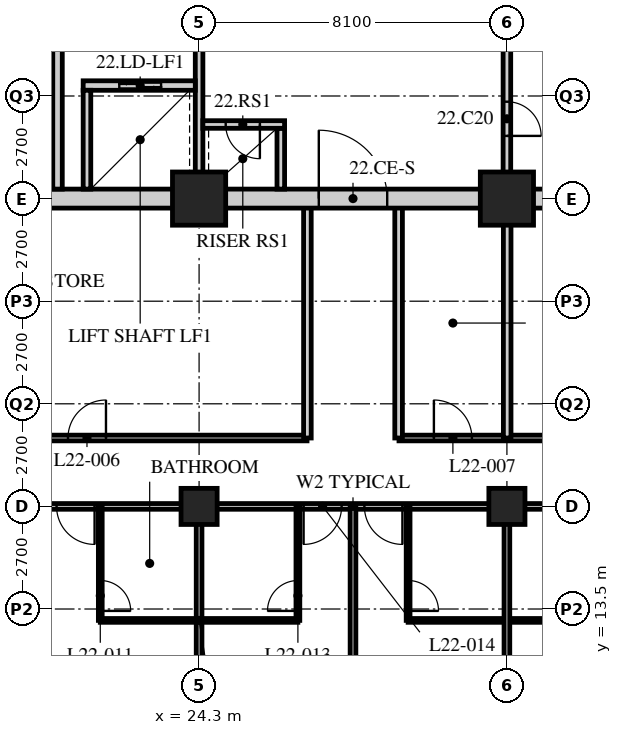
"""IFC4 building model, lengths in metres.
Left out: names, types, materials, properties, quantities, classifications, styles, units other than length and angle.
Written with IfcOpenShell. Run it as: python <this file> out.ifc"""

import sys

from ifc_helpers import new_model, si_unit, direction, frame, frame_2d, origin, origin_2d, place, context, subcontext, project, spatial, rectangle, hollow_rectangle, extrude, element, fill, save


model = new_model("IFC4")
c1 = context("Model", 3, precision=1e-05, world=origin(), true_north=direction((0.0, 1.0)))
c2 = subcontext(c1, "Body", "Model", "MODEL_VIEW")
j1 = project(units=[si_unit("LENGTHUNIT", "METRE"), si_unit("PLANEANGLEUNIT", "RADIAN")], contexts=[c1])
p1 = place(None, origin())
s1 = spatial("IfcSite", under=j1, at=p1, CompositionType="ELEMENT")
p2 = place(p1, origin())
s2 = spatial("IfcBuilding", under=s1, at=p2, CompositionType="ELEMENT")
p3 = place(p2, frame((0.0, 0.0, 87.4)))
s3 = spatial("IfcBuildingStorey", under=s2, at=p3, CompositionType="ELEMENT", Elevation=87.4)
p4 = place(p3, frame((24.3, 16.2, 0.0), z_axis=(0.0, 0.0, 1.0), x_axis=(1.0, 0.0, 0.0)))
e1 = element("IfcColumn", 1, at=p4, inside=s3, PredefinedType="COLUMN", context=c2, shape_type="SweptSolid", body=[
    extrude(hollow_rectangle(XDim=0.95, YDim=0.95, WallThickness=0.095, at=origin_2d()), origin(), (0.0, 0.0, 1.0), 3.4),
])
p5 = place(p3, frame((24.3, 24.3, 0.0), z_axis=(0.0, 0.0, 1.0), x_axis=(1.0, 0.0, 0.0)))
e2 = element("IfcColumn", 2, at=p5, inside=s3, PredefinedType="COLUMN", context=c2, shape_type="SweptSolid", body=[
    extrude(hollow_rectangle(XDim=1.4, YDim=1.4, WallThickness=0.12, at=origin_2d()), origin(), (0.0, 0.0, 1.0), 3.4),
])
p6 = place(p3, frame((32.4, 16.2, 0.0), z_axis=(0.0, 0.0, 1.0), x_axis=(1.0, 0.0, 0.0)))
e3 = element("IfcColumn", 3, at=p6, inside=s3, PredefinedType="COLUMN", context=c2, shape_type="SweptSolid", body=[
    extrude(hollow_rectangle(XDim=0.95, YDim=0.95, WallThickness=0.095, at=origin_2d()), origin(), (0.0, 0.0, 1.0), 3.4),
])
p7 = place(p3, frame((32.4, 24.3, 0.0), z_axis=(0.0, 0.0, 1.0), x_axis=(1.0, 0.0, 0.0)))
e4 = element("IfcColumn", 4, at=p7, inside=s3, PredefinedType="COLUMN", context=c2, shape_type="SweptSolid", body=[
    extrude(hollow_rectangle(XDim=1.4, YDim=1.4, WallThickness=0.12, at=origin_2d()), origin(), (0.0, 0.0, 1.0), 3.4),
])
p8 = place(p3, frame((12.15, 16.2, 0.0), z_axis=(0.0, 0.0, 1.0), x_axis=(1.0, 0.0, 0.0)))
e5 = element("IfcWall", 5, at=p8, inside=s3, PredefinedType="PARTITIONING", context=c2, shape_type="SweptSolid", body=[
    extrude(rectangle(XDim=32.4, YDim=0.15, at=frame_2d((16.2, 0.0))), origin(), (0.0, 0.0, 1.0), 2.388),
])
p9 = place(p8, frame((6.5, 0.0, 0.0)))
e6 = element("IfcOpeningElement", 6, at=p9, cuts=e5, PredefinedType="OPENING", context=c2, shape_type="SweptSolid", body=[
    extrude(rectangle(XDim=1.0, YDim=2.1, at=frame_2d((0.5, 1.05))), frame((0.0, 0.085, 0.0), z_axis=(0.0, -1.0, 0.0), x_axis=(1.0, 0.0, 0.0)), (0.0, 0.0, 1.0), 0.17),
])
p10 = place(p8, frame((8.4, 0.0, 0.0)))
e7 = element("IfcOpeningElement", 7, at=p10, cuts=e5, PredefinedType="OPENING", context=c2, shape_type="SweptSolid", body=[
    extrude(rectangle(XDim=1.0, YDim=2.1, at=frame_2d((0.5, 1.05))), frame((0.0, 0.085, 0.0), z_axis=(0.0, -1.0, 0.0), x_axis=(1.0, 0.0, 0.0)), (0.0, 0.0, 1.0), 0.17),
])
p11 = place(p8, frame((14.9, 0.0, 0.0)))
e8 = element("IfcOpeningElement", 8, at=p11, cuts=e5, PredefinedType="OPENING", context=c2, shape_type="SweptSolid", body=[
    extrude(rectangle(XDim=1.0, YDim=2.1, at=frame_2d((0.5, 1.05))), frame((0.0, 0.085, 0.0), z_axis=(0.0, -1.0, 0.0), x_axis=(1.0, 0.0, 0.0)), (0.0, 0.0, 1.0), 0.17),
])
p12 = place(p8, frame((16.5, 0.0, 0.0)))
e9 = element("IfcOpeningElement", 9, at=p12, cuts=e5, PredefinedType="OPENING", context=c2, shape_type="SweptSolid", body=[
    extrude(rectangle(XDim=1.0, YDim=2.1, at=frame_2d((0.5, 1.05))), frame((0.0, 0.085, 0.0), z_axis=(0.0, -1.0, 0.0), x_axis=(1.0, 0.0, 0.0)), (0.0, 0.0, 1.0), 0.17),
])
p13 = place(p8, frame((23.0, 0.0, 0.0)))
e10 = element("IfcOpeningElement", 10, at=p13, cuts=e5, PredefinedType="OPENING", context=c2, shape_type="SweptSolid", body=[
    extrude(rectangle(XDim=1.0, YDim=2.1, at=frame_2d((0.5, 1.05))), frame((0.0, 0.085, 0.0), z_axis=(0.0, -1.0, 0.0), x_axis=(1.0, 0.0, 0.0)), (0.0, 0.0, 1.0), 0.17),
])
p14 = place(p8, frame((24.9, 0.0, 0.0)))
e11 = element("IfcOpeningElement", 11, at=p14, cuts=e5, PredefinedType="OPENING", context=c2, shape_type="SweptSolid", body=[
    extrude(rectangle(XDim=1.0, YDim=2.1, at=frame_2d((0.5, 1.05))), frame((0.0, 0.085, 0.0), z_axis=(0.0, -1.0, 0.0), x_axis=(1.0, 0.0, 0.0)), (0.0, 0.0, 1.0), 0.17),
])
p15 = place(p8, frame((1.525, 0.0, 0.0)))
e12 = element("IfcOpeningElement", 12, at=p15, cuts=e5, PredefinedType="OPENING", context=c2, shape_type="SweptSolid", body=[
    extrude(rectangle(XDim=1.0, YDim=2.1, at=frame_2d((0.5, 1.05))), frame((0.0, 0.085, 0.0), z_axis=(0.0, -1.0, 0.0), x_axis=(1.0, 0.0, 0.0)), (0.0, 0.0, 1.0), 0.17),
])
p16 = place(p8, frame((29.875, 0.0, 0.0)))
e13 = element("IfcOpeningElement", 13, at=p16, cuts=e5, PredefinedType="OPENING", context=c2, shape_type="SweptSolid", body=[
    extrude(rectangle(XDim=1.0, YDim=2.1, at=frame_2d((0.5, 1.05))), frame((0.0, 0.085, 0.0), z_axis=(0.0, -1.0, 0.0), x_axis=(1.0, 0.0, 0.0)), (0.0, 0.0, 1.0), 0.17),
])
p17 = place(p3, frame((13.95, 18.0, 0.0), z_axis=(0.0, 0.0, 1.0), x_axis=(1.0, 0.0, 0.0)))
e14 = element("IfcWall", 14, at=p17, inside=s3, PredefinedType="PARTITIONING", context=c2, shape_type="SweptSolid", body=[
    extrude(rectangle(XDim=13.19, YDim=0.15, at=frame_2d((6.595, 0.0))), origin(), (0.0, 0.0, 1.0), 3.15),
])
p18 = place(p17, frame((0.3, 0.0, 0.0)))
e15 = element("IfcOpeningElement", 15, at=p18, cuts=e14, PredefinedType="OPENING", context=c2, shape_type="SweptSolid", body=[
    extrude(rectangle(XDim=1.0, YDim=2.1, at=frame_2d((0.5, 1.05))), frame((0.0, 0.085, 0.0), z_axis=(0.0, -1.0, 0.0), x_axis=(1.0, 0.0, 0.0)), (0.0, 0.0, 1.0), 0.17),
])
p19 = place(p17, frame((6.9, 0.0, 0.0)))
e16 = element("IfcOpeningElement", 16, at=p19, cuts=e14, PredefinedType="OPENING", context=c2, shape_type="SweptSolid", body=[
    extrude(rectangle(XDim=1.0, YDim=2.1, at=frame_2d((0.5, 1.05))), frame((0.0, 0.085, 0.0), z_axis=(0.0, -1.0, 0.0), x_axis=(1.0, 0.0, 0.0)), (0.0, 0.0, 1.0), 0.17),
])
p20 = place(p3, frame((29.56, 18.0, 0.0), z_axis=(0.0, 0.0, 1.0), x_axis=(1.0, 0.0, 0.0)))
e17 = element("IfcWall", 17, at=p20, inside=s3, PredefinedType="PARTITIONING", context=c2, shape_type="SweptSolid", body=[
    extrude(rectangle(XDim=13.19, YDim=0.15, at=frame_2d((6.595, 0.0))), origin(), (0.0, 0.0, 1.0), 3.15),
])
p21 = place(p20, frame((0.919, 0.0, 0.0)))
e18 = element("IfcOpeningElement", 18, at=p21, cuts=e17, PredefinedType="OPENING", context=c2, shape_type="SweptSolid", body=[
    extrude(rectangle(XDim=1.0, YDim=2.1, at=frame_2d((0.5, 1.05))), frame((0.0, 0.085, 0.0), z_axis=(0.0, -1.0, 0.0), x_axis=(1.0, 0.0, 0.0)), (0.0, 0.0, 1.0), 0.17),
])
p22 = place(p20, frame((7.519, 0.0, 0.0)))
e19 = element("IfcOpeningElement", 19, at=p22, cuts=e17, PredefinedType="OPENING", context=c2, shape_type="SweptSolid", body=[
    extrude(rectangle(XDim=1.0, YDim=2.1, at=frame_2d((0.5, 1.05))), frame((0.0, 0.085, 0.0), z_axis=(0.0, -1.0, 0.0), x_axis=(1.0, 0.0, 0.0)), (0.0, 0.0, 1.0), 0.17),
])
p23 = place(p3, frame((32.407, 18.0, 0.0), z_axis=(0.0, 0.0, 1.0), x_axis=(0.0, 1.0, 0.0)))
e20 = element("IfcWall", 20, at=p23, inside=s3, PredefinedType="SOLIDWALL", context=c2, shape_type="SweptSolid", body=[
    extrude(rectangle(XDim=6.3, YDim=0.2, at=frame_2d((3.15, 0.0))), origin(), (0.0, 0.0, 1.0), 2.05),
])
for number, where, z_axis, x_axis in (
    (21, (27.15, 18.0, 0.0), (0.0, 0.0, 1.0), (0.0, 1.0, 0.0)),
    (22, (29.55, 18.0, 0.0), (0.0, 0.0, 1.0), (0.0, 1.0, 0.0)),
):
    element("IfcWall", number, at=place(p3, frame(where, z_axis=z_axis, x_axis=x_axis)), inside=s3, PredefinedType="SOLIDWALL", context=c2, shape_type="SweptSolid", body=[
        extrude(rectangle(XDim=6.3, YDim=0.2, at=frame_2d((3.15, 0.0))), origin(), (0.0, 0.0, 1.0), 3.15),
    ])
p24 = place(p3, frame((21.7, 13.2, 0.0), z_axis=(0.0, 0.0, 1.0), x_axis=(1.0, 0.0, 0.0)))
e23 = element("IfcWall", 23, at=p24, inside=s3, PredefinedType="PARTITIONING", context=c2, shape_type="SweptSolid", body=[
    extrude(rectangle(XDim=5.2, YDim=0.1, at=frame_2d((2.6, 0.0))), origin(), (0.0, 0.0, 1.0), 3.15),
])
p25 = place(p3, frame((21.7, 16.2, 0.0), z_axis=(0.0, 0.0, 1.0), x_axis=(0.0, -1.0, 0.0)))
e24 = element("IfcWall", 24, at=p25, inside=s3, PredefinedType="PARTITIONING", context=c2, shape_type="SweptSolid", body=[
    extrude(rectangle(XDim=3.0, YDim=0.1, at=frame_2d((1.5, 0.0))), origin(), (0.0, 0.0, 1.0), 3.15),
])
p26 = place(p25, frame((1.95, 0.0, 0.0)))
e25 = element("IfcOpeningElement", 25, at=p26, cuts=e24, PredefinedType="OPENING", context=c2, shape_type="SweptSolid", body=[
    extrude(rectangle(XDim=0.8, YDim=2.1, at=frame_2d((0.4, 1.05))), frame((0.0, 0.06, 0.0), z_axis=(0.0, -1.0, 0.0), x_axis=(1.0, 0.0, 0.0)), (0.0, 0.0, 1.0), 0.12),
])
p27 = place(p3, frame((24.3, 16.2, 0.0), z_axis=(0.0, 0.0, 1.0), x_axis=(0.0, -1.0, 0.0)))
e26 = element("IfcWall", 26, at=p27, inside=s3, PredefinedType="PARTITIONING", context=c2, shape_type="SweptSolid", body=[
    extrude(rectangle(XDim=15.9, YDim=0.15, at=frame_2d((7.95, 0.0))), origin(), (0.0, 0.0, 1.0), 2.05),
])
p28 = place(p3, frame((26.9, 16.2, 0.0), z_axis=(0.0, 0.0, 1.0), x_axis=(0.0, -1.0, 0.0)))
e27 = element("IfcWall", 27, at=p28, inside=s3, PredefinedType="PARTITIONING", context=c2, shape_type="SweptSolid", body=[
    extrude(rectangle(XDim=3.0, YDim=0.1, at=frame_2d((1.5, 0.0))), origin(), (0.0, 0.0, 1.0), 3.15),
])
p29 = place(p28, frame((1.95, 0.0, 0.0)))
e28 = element("IfcOpeningElement", 28, at=p29, cuts=e27, PredefinedType="OPENING", context=c2, shape_type="SweptSolid", body=[
    extrude(rectangle(XDim=0.8, YDim=2.1, at=frame_2d((0.4, 1.05))), frame((0.0, 0.06, 0.0), z_axis=(0.0, -1.0, 0.0), x_axis=(1.0, 0.0, 0.0)), (0.0, 0.0, 1.0), 0.12),
])
p30 = place(p3, frame((28.35, 16.2, 0.0), z_axis=(0.0, 0.0, 1.0), x_axis=(0.0, -1.0, 0.0)))
e29 = element("IfcWall", 29, at=p30, inside=s3, PredefinedType="PARTITIONING", context=c2, shape_type="SweptSolid", body=[
    extrude(rectangle(XDim=15.9, YDim=0.15, at=frame_2d((7.95, 0.0))), origin(), (0.0, 0.0, 1.0), 3.15),
])
p31 = place(p3, frame((29.8, 13.2, 0.0), z_axis=(0.0, 0.0, 1.0), x_axis=(1.0, 0.0, 0.0)))
e30 = element("IfcWall", 30, at=p31, inside=s3, PredefinedType="PARTITIONING", context=c2, shape_type="SweptSolid", body=[
    extrude(rectangle(XDim=5.2, YDim=0.1, at=frame_2d((2.6, 0.0))), origin(), (0.0, 0.0, 1.0), 3.15),
])
p32 = place(p3, frame((29.8, 16.2, 0.0), z_axis=(0.0, 0.0, 1.0), x_axis=(0.0, -1.0, 0.0)))
e31 = element("IfcWall", 31, at=p32, inside=s3, PredefinedType="PARTITIONING", context=c2, shape_type="SweptSolid", body=[
    extrude(rectangle(XDim=3.0, YDim=0.1, at=frame_2d((1.5, 0.0))), origin(), (0.0, 0.0, 1.0), 3.15),
])
p33 = place(p32, frame((1.95, 0.0, 0.0)))
e32 = element("IfcOpeningElement", 32, at=p33, cuts=e31, PredefinedType="OPENING", context=c2, shape_type="SweptSolid", body=[
    extrude(rectangle(XDim=0.8, YDim=2.1, at=frame_2d((0.4, 1.05))), frame((0.0, 0.06, 0.0), z_axis=(0.0, -1.0, 0.0), x_axis=(1.0, 0.0, 0.0)), (0.0, 0.0, 1.0), 0.12),
])
p34 = place(p3, frame((32.4, 16.2, 0.0), z_axis=(0.0, 0.0, 1.0), x_axis=(0.0, -1.0, 0.0)))
e33 = element("IfcWall", 33, at=p34, inside=s3, PredefinedType="PARTITIONING", context=c2, shape_type="SweptSolid", body=[
    extrude(rectangle(XDim=15.9, YDim=0.15, at=frame_2d((7.95, 0.0))), origin(), (0.0, 0.0, 1.0), 2.05),
])
p35 = place(p3, frame((15.95, 24.3, 0.0), z_axis=(0.0, 0.0, 1.0), x_axis=(1.0, 0.0, 0.0)))
e34 = element("IfcWall", 34, at=p35, inside=s3, PredefinedType="SOLIDWALL", context=c2, shape_type="SweptSolid", body=[
    extrude(rectangle(XDim=8.35, YDim=0.5, at=frame_2d((4.175, 0.0))), origin(), (0.0, 0.0, 1.0), 2.388),
])
p36 = place(p3, frame((24.3, 24.3, 0.0), z_axis=(0.0, 0.0, 1.0), x_axis=(1.0, 0.0, 0.0)))
e35 = element("IfcWall", 35, at=p36, inside=s3, PredefinedType="SOLIDWALL", context=c2, shape_type="SweptSolid", body=[
    extrude(rectangle(XDim=8.1, YDim=0.5, at=frame_2d((4.05, 0.0))), origin(), (0.0, 0.0, 1.0), 2.5),
])
p37 = place(p36, frame((3.15, 0.0, 0.0)))
e36 = element("IfcOpeningElement", 36, at=p37, cuts=e35, PredefinedType="OPENING", context=c2, shape_type="SweptSolid", body=[
    extrude(rectangle(XDim=1.8, YDim=2.4, at=frame_2d((0.9, 1.2))), frame((0.0, 0.26, 0.0), z_axis=(0.0, -1.0, 0.0), x_axis=(1.0, 0.0, 0.0)), (0.0, 0.0, 1.0), 0.52),
])
p38 = place(p3, frame((32.4, 24.3, 0.0), z_axis=(0.0, 0.0, 1.0), x_axis=(1.0, 0.0, 0.0)))
e37 = element("IfcWall", 37, at=p38, inside=s3, PredefinedType="SOLIDWALL", context=c2, shape_type="SweptSolid", body=[
    extrude(rectangle(XDim=8.35, YDim=0.5, at=frame_2d((4.175, 0.0))), origin(), (0.0, 0.0, 1.0), 2.388),
])
p39 = place(p3, frame((24.3, 24.55, 0.0), z_axis=(0.0, 0.0, 1.0), x_axis=(0.0, 1.0, 0.0)))
e38 = element("IfcWall", 38, at=p39, inside=s3, PredefinedType="SOLIDWALL", context=c2, shape_type="SweptSolid", body=[
    extrude(rectangle(XDim=7.75, YDim=0.2, at=frame_2d((3.875, 0.0))), origin(), (0.0, 0.0, 1.0), 2.388),
])
p40 = place(p39, frame((4.6, 0.0, 0.0)))
e39 = element("IfcOpeningElement", 39, at=p40, cuts=e38, PredefinedType="OPENING", context=c2, shape_type="SweptSolid", body=[
    extrude(rectangle(XDim=1.2, YDim=2.1, at=frame_2d((0.6, 1.05))), frame((0.0, 0.11, 0.0), z_axis=(0.0, -1.0, 0.0), x_axis=(1.0, 0.0, 0.0)), (0.0, 0.0, 1.0), 0.22),
])
p41 = place(p3, frame((20.575, 24.55, 0.0), z_axis=(0.0, 0.0, 1.0), x_axis=(0.0, 1.0, 0.0)))
e40 = element("IfcWall", 40, at=p41, inside=s3, PredefinedType="SOLIDWALL", context=c2, shape_type="SweptSolid", body=[
    extrude(rectangle(XDim=7.75, YDim=0.25, at=frame_2d((3.875, 0.0))), origin(), (0.0, 0.0, 1.0), 3.15),
])
p42 = place(p41, frame((6.2, 0.0, 0.0)))
e41 = element("IfcOpeningElement", 41, at=p42, cuts=e40, PredefinedType="OPENING", context=c2, shape_type="SweptSolid", body=[
    extrude(rectangle(XDim=1.2, YDim=2.1, at=frame_2d((0.6, 1.05))), frame((0.0, 0.135, 0.0), z_axis=(0.0, -1.0, 0.0), x_axis=(1.0, 0.0, 0.0)), (0.0, 0.0, 1.0), 0.27),
])
p43 = place(p3, frame((21.25, 27.275, 0.0), z_axis=(0.0, 0.0, 1.0), x_axis=(1.0, 0.0, 0.0)))
e42 = element("IfcWall", 42, at=p43, inside=s3, PredefinedType="SOLIDWALL", context=c2, shape_type="SweptSolid", body=[
    extrude(rectangle(XDim=2.95, YDim=0.25, at=frame_2d((1.475, 0.0))), origin(), (0.0, 0.0, 1.0), 3.15),
])
p44 = place(p43, frame((0.95, 0.0, 0.0)))
e43 = element("IfcOpeningElement", 43, at=p44, cuts=e42, PredefinedType="OPENING", context=c2, shape_type="SweptSolid", body=[
    extrude(rectangle(XDim=1.1, YDim=2.4, at=frame_2d((0.55, 1.2))), frame((0.0, 0.135, 0.0), z_axis=(0.0, -1.0, 0.0), x_axis=(1.0, 0.0, 0.0)), (0.0, 0.0, 1.0), 0.27),
])
p45 = place(p3, frame((21.35, 24.55, 0.0), z_axis=(0.0, 0.0, 1.0), x_axis=(0.0, 1.0, 0.0)))
e44 = element("IfcWall", 44, at=p45, inside=s3, PredefinedType="SOLIDWALL", context=c2, shape_type="SweptSolid", body=[
    extrude(rectangle(XDim=2.6, YDim=0.2, at=frame_2d((1.3, 0.0))), origin(), (0.0, 0.0, 1.0), 3.15),
])
p46 = place(p3, frame((26.45, 24.55, 0.0), z_axis=(0.0, 0.0, 1.0), x_axis=(0.0, 1.0, 0.0)))
e45 = element("IfcWall", 45, at=p46, inside=s3, PredefinedType="SOLIDWALL", context=c2, shape_type="SweptSolid", body=[
    extrude(rectangle(XDim=1.6, YDim=0.2, at=frame_2d((0.8, 0.0))), origin(), (0.0, 0.0, 1.0), 3.15),
])
p47 = place(p3, frame((24.4, 26.25, 0.0), z_axis=(0.0, 0.0, 1.0), x_axis=(1.0, 0.0, 0.0)))
e46 = element("IfcWall", 46, at=p47, inside=s3, PredefinedType="SOLIDWALL", context=c2, shape_type="SweptSolid", body=[
    extrude(rectangle(XDim=2.15, YDim=0.2, at=frame_2d((1.075, 0.0))), origin(), (0.0, 0.0, 1.0), 3.15),
])
p48 = place(p47, frame((0.6, 0.0, 0.0)))
e47 = element("IfcOpeningElement", 47, at=p48, cuts=e46, PredefinedType="OPENING", context=c2, shape_type="SweptSolid", body=[
    extrude(rectangle(XDim=0.9, YDim=2.1, at=frame_2d((0.45, 1.05))), frame((0.0, 0.11, 0.0), z_axis=(0.0, -1.0, 0.0), x_axis=(1.0, 0.0, 0.0)), (0.0, 0.0, 1.0), 0.22),
])
p49 = place(p3, frame((32.4, 24.55, 0.0), z_axis=(0.0, 0.0, 1.0), x_axis=(0.0, 1.0, 0.0)))
e48 = element("IfcWall", 48, at=p49, inside=s3, PredefinedType="PARTITIONING", context=c2, shape_type="SweptSolid", body=[
    extrude(rectangle(XDim=7.75, YDim=0.2, at=frame_2d((3.875, 0.0))), origin(), (0.0, 0.0, 1.0), 2.388),
])
p50 = place(p49, frame((1.4, 0.0, 0.0)))
e49 = element("IfcOpeningElement", 49, at=p50, cuts=e48, PredefinedType="OPENING", context=c2, shape_type="SweptSolid", body=[
    extrude(rectangle(XDim=0.9, YDim=2.1, at=frame_2d((0.45, 1.05))), frame((0.0, 0.11, 0.0), z_axis=(0.0, -1.0, 0.0), x_axis=(1.0, 0.0, 0.0)), (0.0, 0.0, 1.0), 0.22),
])
p51 = place(p49, frame((5.35, 0.0, 0.0)))
e50 = element("IfcOpeningElement", 50, at=p51, cuts=e48, PredefinedType="OPENING", context=c2, shape_type="SweptSolid", body=[
    extrude(rectangle(XDim=0.9, YDim=2.1, at=frame_2d((0.45, 1.05))), frame((0.0, 0.11, 0.0), z_axis=(0.0, -1.0, 0.0), x_axis=(1.0, 0.0, 0.0)), (0.0, 0.0, 1.0), 0.22),
])
p52 = place(p19, origin())
e51 = element("IfcDoor", 51, at=p52, inside=s3, OperationType="SINGLE_SWING_RIGHT", PredefinedType="DOOR", context=c2, shape_type="SweptSolid", body=[
    extrude(rectangle(XDim=1.0, YDim=2.1, at=frame_2d((0.5, 1.05))), frame((0.0, 0.025, 0.0), z_axis=(0.0, -1.0, 0.0), x_axis=(1.0, 0.0, 0.0)), (0.0, 0.0, 1.0), 0.05),
])
fill(e16, e51)
p53 = place(p21, origin())
e52 = element("IfcDoor", 52, at=p53, inside=s3, OperationType="SINGLE_SWING_LEFT", PredefinedType="DOOR", context=c2, shape_type="SweptSolid", body=[
    extrude(rectangle(XDim=1.0, YDim=2.1, at=frame_2d((0.5, 1.05))), frame((0.0, 0.025, 0.0), z_axis=(0.0, -1.0, 0.0), x_axis=(1.0, 0.0, 0.0)), (0.0, 0.0, 1.0), 0.05),
])
fill(e18, e52)
p54 = place(p26, origin())
e53 = element("IfcDoor", 53, at=p54, inside=s3, OperationType="SINGLE_SWING_RIGHT", PredefinedType="DOOR", context=c2, shape_type="SweptSolid", body=[
    extrude(rectangle(XDim=0.8, YDim=2.1, at=frame_2d((0.4, 1.05))), frame((0.0, 0.025, 0.0), z_axis=(0.0, -1.0, 0.0), x_axis=(1.0, 0.0, 0.0)), (0.0, 0.0, 1.0), 0.05),
])
fill(e25, e53)
p55 = place(p10, origin())
e54 = element("IfcDoor", 54, at=p55, inside=s3, OperationType="SINGLE_SWING_LEFT", PredefinedType="DOOR", context=c2, shape_type="SweptSolid", body=[
    extrude(rectangle(XDim=1.0, YDim=2.1, at=frame_2d((0.5, 1.05))), frame((0.0, 0.025, 0.0), z_axis=(0.0, -1.0, 0.0), x_axis=(1.0, 0.0, 0.0)), (0.0, 0.0, 1.0), 0.05),
])
fill(e7, e54)
p56 = place(p29, origin())
e55 = element("IfcDoor", 55, at=p56, inside=s3, OperationType="SINGLE_SWING_LEFT", PredefinedType="DOOR", context=c2, shape_type="SweptSolid", body=[
    extrude(rectangle(XDim=0.8, YDim=2.1, at=frame_2d((0.4, 1.05))), frame((0.0, 0.025, 0.0), z_axis=(0.0, -1.0, 0.0), x_axis=(1.0, 0.0, 0.0)), (0.0, 0.0, 1.0), 0.05),
])
fill(e28, e55)
p57 = place(p11, origin())
e56 = element("IfcDoor", 56, at=p57, inside=s3, OperationType="SINGLE_SWING_RIGHT", PredefinedType="DOOR", context=c2, shape_type="SweptSolid", body=[
    extrude(rectangle(XDim=1.0, YDim=2.1, at=frame_2d((0.5, 1.05))), frame((0.0, 0.025, 0.0), z_axis=(0.0, -1.0, 0.0), x_axis=(1.0, 0.0, 0.0)), (0.0, 0.0, 1.0), 0.05),
])
fill(e8, e56)
p58 = place(p33, origin())
e57 = element("IfcDoor", 57, at=p58, inside=s3, OperationType="SINGLE_SWING_RIGHT", PredefinedType="DOOR", context=c2, shape_type="SweptSolid", body=[
    extrude(rectangle(XDim=0.8, YDim=2.1, at=frame_2d((0.4, 1.05))), frame((0.0, 0.025, 0.0), z_axis=(0.0, -1.0, 0.0), x_axis=(1.0, 0.0, 0.0)), (0.0, 0.0, 1.0), 0.05),
])
fill(e32, e57)
p59 = place(p12, origin())
e58 = element("IfcDoor", 58, at=p59, inside=s3, OperationType="SINGLE_SWING_LEFT", PredefinedType="DOOR", context=c2, shape_type="SweptSolid", body=[
    extrude(rectangle(XDim=1.0, YDim=2.1, at=frame_2d((0.5, 1.05))), frame((0.0, 0.025, 0.0), z_axis=(0.0, -1.0, 0.0), x_axis=(1.0, 0.0, 0.0)), (0.0, 0.0, 1.0), 0.05),
])
fill(e9, e58)
p60 = place(p50, origin())
e59 = element("IfcDoor", 59, at=p60, inside=s3, OperationType="SINGLE_SWING_RIGHT", PredefinedType="DOOR", context=c2, shape_type="SweptSolid", body=[
    extrude(rectangle(XDim=0.9, YDim=2.1, at=frame_2d((0.45, 1.05))), frame((0.0, 0.025, 0.0), z_axis=(0.0, -1.0, 0.0), x_axis=(1.0, 0.0, 0.0)), (0.0, 0.0, 1.0), 0.05),
])
fill(e49, e59)
p61 = place(p48, origin())
e60 = element("IfcDoor", 60, at=p61, inside=s3, OperationType="SINGLE_SWING_LEFT", PredefinedType="DOOR", context=c2, shape_type="SweptSolid", body=[
    extrude(rectangle(XDim=0.9, YDim=2.1, at=frame_2d((0.45, 1.05))), frame((0.0, 0.025, 0.0), z_axis=(0.0, -1.0, 0.0), x_axis=(1.0, 0.0, 0.0)), (0.0, 0.0, 1.0), 0.05),
])
fill(e47, e60)
p62 = place(p44, origin())
e61 = element("IfcDoor", 61, at=p62, inside=s3, OperationType="DOUBLE_DOOR_SLIDING", PredefinedType="DOOR", context=c2, shape_type="SweptSolid", body=[
    extrude(rectangle(XDim=1.1, YDim=2.4, at=frame_2d((0.55, 1.2))), frame((0.0, 0.025, 0.0), z_axis=(0.0, -1.0, 0.0), x_axis=(1.0, 0.0, 0.0)), (0.0, 0.0, 1.0), 0.05),
])
fill(e43, e61)
p63 = place(p37, origin())
e62 = element("IfcDoor", 62, at=p63, inside=s3, OperationType="DOUBLE_DOOR_SINGLE_SWING", PredefinedType="DOOR", context=c2, shape_type="SweptSolid", body=[
    extrude(rectangle(XDim=1.8, YDim=2.4, at=frame_2d((0.9, 1.2))), frame((0.0, 0.025, 0.0), z_axis=(0.0, -1.0, 0.0), x_axis=(1.0, 0.0, 0.0)), (0.0, 0.0, 1.0), 0.05),
])
fill(e36, e62)
save(model, sys.argv[1])
